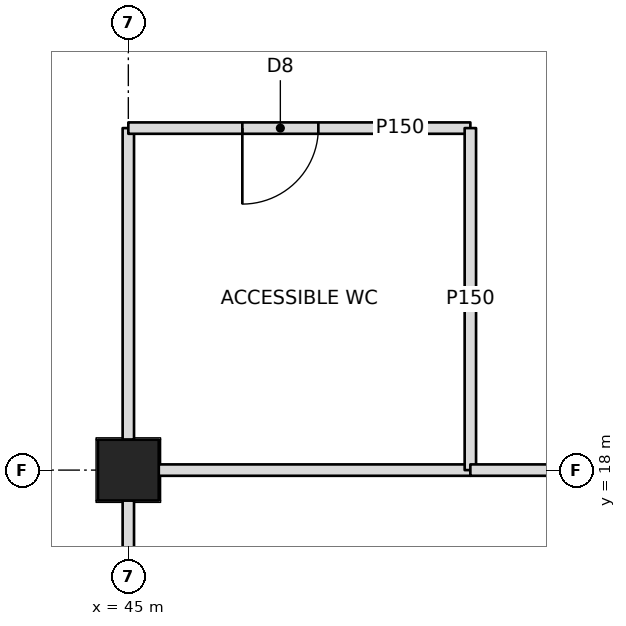
"""IFC4 building model, lengths in metres.
Left out: names, types, materials, properties, quantities, classifications, styles, units other than length and angle.
Written with IfcOpenShell. Run it as: python <this file> out.ifc"""

import sys

from ifc_helpers import new_model, si_unit, direction, frame, frame_2d, origin, origin_2d, place, context, subcontext, project, spatial, rectangle, hollow_rectangle, extrude, element, fill, save


model = new_model("IFC4")
c1 = context("Model", 3, precision=1e-05, world=origin(), true_north=direction((0.0, 1.0)))
c2 = subcontext(c1, "Body", "Model", "MODEL_VIEW")
j1 = project(units=[si_unit("LENGTHUNIT", "METRE"), si_unit("PLANEANGLEUNIT", "RADIAN")], contexts=[c1])
p1 = place(None, origin())
s1 = spatial("IfcSite", under=j1, at=p1, CompositionType="ELEMENT")
p2 = place(p1, origin())
s2 = spatial("IfcBuilding", under=s1, at=p2, CompositionType="ELEMENT")
p3 = place(p2, frame((0.0, 0.0, 16.0)))
s3 = spatial("IfcBuildingStorey", under=s2, at=p3, CompositionType="ELEMENT", Elevation=16.0)
p4 = place(p3, frame((45.0, 18.0, 0.0), z_axis=(0.0, 0.0, 1.0), x_axis=(0.0, 1.0, 0.0)))
e1 = element("IfcColumn", 1, at=p4, inside=s3, PredefinedType="COLUMN", context=c2, shape_type="SweptSolid", body=[
    extrude(hollow_rectangle(XDim=0.8, YDim=0.8, WallThickness=0.1, at=origin_2d()), origin(), (0.0, 0.0, 1.0), 7.0),
])
p5 = place(p3, frame((45.0, 9.4, 0.0), z_axis=(0.0, 0.0, 1.0), x_axis=(0.0, 1.0, 0.0)))
e2 = element("IfcWall", 2, at=p5, inside=s3, PredefinedType="PARTITIONING", context=c2, shape_type="SweptSolid", body=[
    extrude(rectangle(XDim=8.2, YDim=0.15, at=frame_2d((4.1, 0.0))), origin(), (0.0, 0.0, 1.0), 5.753),
])
for number, where, z_axis, x_axis in (
    (3, (45.4, 18.0, 0.0), (0.0, 0.0, 1.0), (1.0, 0.0, 0.0)),
    (4, (45.0, 18.4, 0.0), (0.0, 0.0, 1.0), (0.0, 1.0, 0.0)),
):
    element("IfcWall", number, at=place(p3, frame(where, z_axis=z_axis, x_axis=x_axis)), inside=s3, PredefinedType="PARTITIONING", context=c2, shape_type="SweptSolid", body=[
        extrude(rectangle(XDim=4.1, YDim=0.15, at=frame_2d((2.05, 0.0))), origin(), (0.0, 0.0, 1.0), 5.753),
    ])
p6 = place(p3, frame((45.0, 22.5, 0.0), z_axis=(0.0, 0.0, 1.0), x_axis=(1.0, 0.0, 0.0)))
e5 = element("IfcWall", 5, at=p6, inside=s3, PredefinedType="PARTITIONING", context=c2, shape_type="SweptSolid", body=[
    extrude(rectangle(XDim=4.5, YDim=0.15, at=frame_2d((2.25, 0.0))), origin(), (0.0, 0.0, 1.0), 5.752),
])
p7 = place(p6, frame((1.5, 0.0, 0.0)))
e6 = element("IfcOpeningElement", 6, at=p7, cuts=e5, PredefinedType="OPENING", context=c2, shape_type="SweptSolid", body=[
    extrude(rectangle(XDim=1.0, YDim=2.1, at=frame_2d((0.5, 1.05))), frame((0.0, 0.085, 0.0), z_axis=(0.0, -1.0, 0.0), x_axis=(1.0, 0.0, 0.0)), (0.0, 0.0, 1.0), 0.17),
])
p8 = place(p3, frame((49.5, 22.5, 0.0), z_axis=(0.0, 0.0, 1.0), x_axis=(0.0, -1.0, 0.0)))
e7 = element("IfcWall", 7, at=p8, inside=s3, PredefinedType="PARTITIONING", context=c2, shape_type="SweptSolid", body=[
    extrude(rectangle(XDim=4.5, YDim=0.15, at=frame_2d((2.25, 0.0))), origin(), (0.0, 0.0, 1.0), 5.752),
])
p9 = place(p3, frame((49.5, 18.0, 0.0), z_axis=(0.0, 0.0, 1.0), x_axis=(1.0, 0.0, 0.0)))
e8 = element("IfcWall", 8, at=p9, inside=s3, PredefinedType="PARTITIONING", context=c2, shape_type="SweptSolid", body=[
    extrude(rectangle(XDim=4.1, YDim=0.15, at=frame_2d((2.05, 0.0))), origin(), (0.0, 0.0, 1.0), 5.753),
])
p10 = place(p7, frame((1.0, 0.0, 0.0), z_axis=(0.0, 0.0, 1.0), x_axis=(-1.0, 0.0, 0.0)))
e9 = element("IfcDoor", 9, at=p10, inside=s3, OperationType="SINGLE_SWING_RIGHT", PredefinedType="DOOR", context=c2, shape_type="SweptSolid", body=[
    extrude(rectangle(XDim=1.0, YDim=2.1, at=frame_2d((0.5, 1.05))), frame((0.0, 0.025, 0.0), z_axis=(0.0, -1.0, 0.0), x_axis=(1.0, 0.0, 0.0)), (0.0, 0.0, 1.0), 0.05),
])
fill(e6, e9)
save(model, sys.argv[1])
